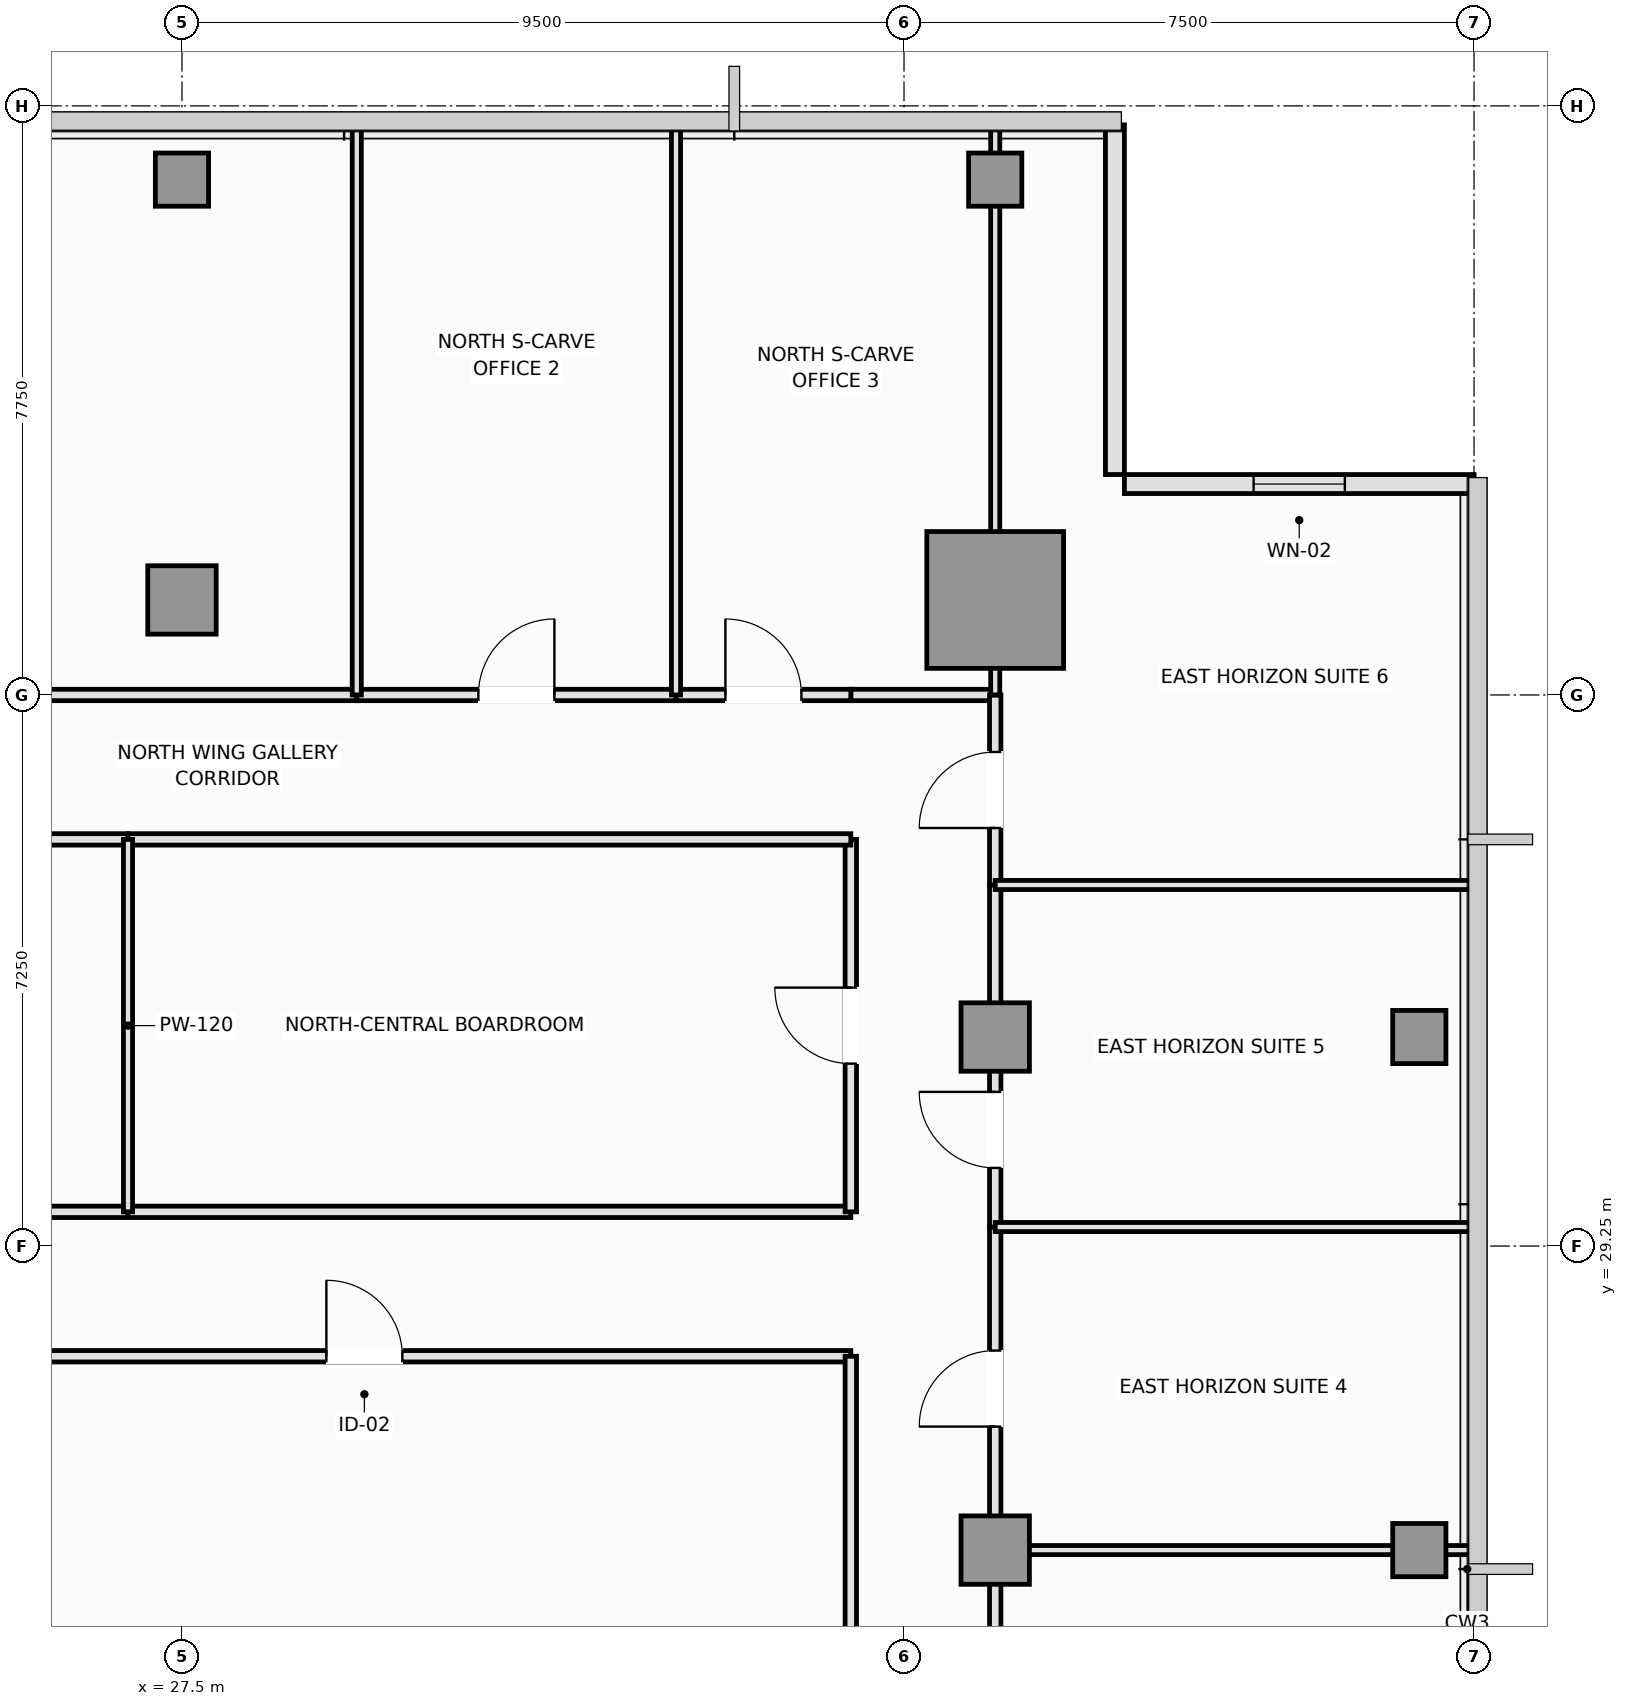
"""IFC4 building model, lengths in metres.
Left out: names, types, materials, properties, quantities, classifications, styles, units other than length and angle.
Written with IfcOpenShell. Run it as: python <this file> out.ifc"""

import sys

from ifc_helpers import new_model, si_unit, direction, frame, frame_2d, origin, origin_2d, place, context, subcontext, project, spatial, rectangle, extrude, element, fill, save


model = new_model("IFC4")
c1 = context("Model", 3, precision=1e-05, world=origin(), true_north=direction((0.0, 1.0)))
c2 = subcontext(c1, "Body", "Model", "MODEL_VIEW")
j1 = project(units=[si_unit("LENGTHUNIT", "METRE"), si_unit("PLANEANGLEUNIT", "RADIAN")], contexts=[c1])
p1 = place(None, origin())
s1 = spatial("IfcSite", under=j1, at=p1, CompositionType="ELEMENT")
p2 = place(p1, origin())
s2 = spatial("IfcBuilding", under=s1, at=p2, CompositionType="ELEMENT")
p3 = place(p2, frame((0.0, 0.0, 284.75)))
s3 = spatial("IfcBuildingStorey", under=s2, at=p3, CompositionType="ELEMENT", Elevation=284.75)
p4 = place(p3, frame((38.2, 37.75, 0.0), z_axis=(0.0, 0.0, 1.0), x_axis=(1.0, 0.0, 0.0)))
e1 = element("IfcColumn", 1, at=p4, inside=s3, PredefinedType="COLUMN", context=c2, shape_type="SweptSolid", body=[
    extrude(rectangle(XDim=1.8, YDim=1.8, at=origin_2d()), origin(), (0.0, 0.0, 1.0), 3.55),
])
for number, where, z_axis, x_axis in (
    (2, (27.5, 37.75, 0.0), (0.0, 0.0, 1.0), (1.0, 0.0, 0.0)),
    (3, (38.2, 25.25, 0.0), (0.0, 0.0, 1.0), (1.0, 0.0, 0.0)),
    (4, (38.2, 32.0, 0.0), (0.0, 0.0, 1.0), (1.0, 0.0, 0.0)),
):
    element("IfcColumn", number, at=place(p3, frame(where, z_axis=z_axis, x_axis=x_axis)), inside=s3, PredefinedType="COLUMN", context=c2, shape_type="SweptSolid", body=[
        extrude(rectangle(XDim=0.9, YDim=0.9, at=origin_2d()), origin(), (0.0, 0.0, 1.0), 3.55),
    ])
for number, where, z_axis, x_axis in (
    (5, (43.78, 25.25, 0.0), (0.0, 0.0, 1.0), (1.0, 0.0, 0.0)),
    (6, (43.78, 32.0, 0.0), (0.0, 0.0, 1.0), (1.0, 0.0, 0.0)),
    (7, (27.5, 43.28, 0.0), (0.0, 0.0, 1.0), (1.0, 0.0, 0.0)),
    (8, (38.2, 43.28, 0.0), (0.0, 0.0, 1.0), (1.0, 0.0, 0.0)),
):
    element("IfcColumn", number, at=place(p3, frame(where, z_axis=z_axis, x_axis=x_axis)), inside=s3, PredefinedType="COLUMN", context=c2, shape_type="SweptSolid", body=[
        extrude(rectangle(XDim=0.7, YDim=0.7, at=origin_2d()), origin(), (0.0, 0.0, 1.0), 3.55),
    ])
p5 = place(p3, frame((44.5, 39.275, 0.0), z_axis=(0.0, 0.0, 1.0), x_axis=(-1.0, 0.0, 0.0)))
e9 = element("IfcWall", 9, at=p5, inside=s3, PredefinedType="SOLIDWALL", context=c2, shape_type="SweptSolid", body=[
    extrude(rectangle(XDim=4.6, YDim=0.25, at=frame_2d((2.3, 0.0))), origin(), (0.0, 0.0, 1.0), 3.39),
])
p6 = place(p5, frame((1.7, 0.0, 0.9)))
e10 = element("IfcOpeningElement", 10, at=p6, cuts=e9, PredefinedType="OPENING", context=c2, shape_type="SweptSolid", body=[
    extrude(rectangle(XDim=1.2, YDim=1.8, at=frame_2d((0.6, 0.9))), frame((0.0, 0.135, 0.0), z_axis=(0.0, -1.0, 0.0), x_axis=(1.0, 0.0, 0.0)), (0.0, 0.0, 1.0), 0.27),
])
p7 = place(p3, frame((39.775, 39.4, 0.0), z_axis=(0.0, 0.0, 1.0), x_axis=(0.0, 1.0, 0.0)))
e11 = element("IfcWall", 11, at=p7, inside=s3, PredefinedType="SOLIDWALL", context=c2, shape_type="SweptSolid", body=[
    extrude(rectangle(XDim=4.6, YDim=0.25, at=frame_2d((2.3, 0.0))), origin(), (0.0, 0.0, 1.0), 3.39),
])
p8 = place(p3, frame((19.9, 29.7, 0.0), z_axis=(0.0, 0.0, 1.0), x_axis=(1.0, 0.0, 0.0)))
e12 = element("IfcWall", 12, at=p8, inside=s3, PredefinedType="PARTITIONING", context=c2, shape_type="SweptSolid", body=[
    extrude(rectangle(XDim=6.89, YDim=0.15, at=frame_2d((3.445, 0.0))), origin(), (0.0, 0.0, 1.0), 3.39),
])
p9 = place(p3, frame((26.79, 29.7, 0.0), z_axis=(0.0, 0.0, 1.0), x_axis=(1.0, 0.0, 0.0)))
e13 = element("IfcWall", 13, at=p9, inside=s3, PredefinedType="PARTITIONING", context=c2, shape_type="SweptSolid", body=[
    extrude(rectangle(XDim=9.51, YDim=0.15, at=frame_2d((4.755, 0.0))), origin(), (0.0, 0.0, 1.0), 3.39),
])
p10 = place(p3, frame((23.5, 27.8, 0.0), z_axis=(0.0, 0.0, 1.0), x_axis=(1.0, 0.0, 0.0)))
e14 = element("IfcWall", 14, at=p10, inside=s3, PredefinedType="PARTITIONING", context=c2, shape_type="SweptSolid", body=[
    extrude(rectangle(XDim=12.8, YDim=0.15, at=frame_2d((6.4, 0.0))), origin(), (0.0, 0.0, 1.0), 3.39),
])
p11 = place(p10, frame((5.9, 0.0, 0.0)))
e15 = element("IfcOpeningElement", 15, at=p11, cuts=e14, PredefinedType="OPENING", context=c2, shape_type="SweptSolid", body=[
    extrude(rectangle(XDim=1.0, YDim=2.15, at=frame_2d((0.5, 1.075))), frame((0.0, 0.085, 0.0), z_axis=(0.0, -1.0, 0.0), x_axis=(1.0, 0.0, 0.0)), (0.0, 0.0, 1.0), 0.17),
])
p12 = place(p3, frame((36.3, 29.7, 0.0), z_axis=(0.0, 0.0, 1.0), x_axis=(0.0, 1.0, 0.0)))
e16 = element("IfcWall", 16, at=p12, inside=s3, PredefinedType="PARTITIONING", context=c2, shape_type="SweptSolid", body=[
    extrude(rectangle(XDim=4.9, YDim=0.15, at=frame_2d((2.45, 0.0))), origin(), (0.0, 0.0, 1.0), 3.39),
])
p13 = place(p12, frame((1.95, 0.0, 0.0)))
e17 = element("IfcOpeningElement", 17, at=p13, cuts=e16, PredefinedType="OPENING", context=c2, shape_type="SweptSolid", body=[
    extrude(rectangle(XDim=1.0, YDim=2.15, at=frame_2d((0.5, 1.075))), frame((0.0, 0.085, 0.0), z_axis=(0.0, -1.0, 0.0), x_axis=(1.0, 0.0, 0.0)), (0.0, 0.0, 1.0), 0.17),
])
p14 = place(p3, frame((36.3, 17.6, 0.0), z_axis=(0.0, 0.0, 1.0), x_axis=(0.0, 1.0, 0.0)))
e18 = element("IfcWall", 18, at=p14, inside=s3, PredefinedType="PARTITIONING", context=c2, shape_type="SweptSolid", body=[
    extrude(rectangle(XDim=10.2, YDim=0.15, at=frame_2d((5.1, 0.0))), origin(), (0.0, 0.0, 1.0), 3.39),
])
p15 = place(p3, frame((36.3, 36.5, 0.0), z_axis=(0.0, 0.0, 1.0), x_axis=(1.0, 0.0, 0.0)))
e19 = element("IfcWall", 19, at=p15, inside=s3, PredefinedType="PARTITIONING", context=c2, shape_type="SweptSolid", body=[
    extrude(rectangle(XDim=1.9, YDim=0.15, at=frame_2d((0.95, 0.0))), origin(), (0.0, 0.0, 1.0), 3.39),
])
p16 = place(p3, frame((38.2, 21.0, 0.0), z_axis=(0.0, 0.0, 1.0), x_axis=(0.0, 1.0, 0.0)))
e20 = element("IfcWall", 20, at=p16, inside=s3, PredefinedType="PARTITIONING", context=c2, shape_type="SweptSolid", body=[
    extrude(rectangle(XDim=4.25, YDim=0.15, at=frame_2d((2.125, 0.0))), origin(), (0.0, 0.0, 1.0), 2.99),
])
p17 = place(p16, frame((1.625, 0.0, 0.0)))
e21 = element("IfcOpeningElement", 21, at=p17, cuts=e20, PredefinedType="OPENING", context=c2, shape_type="SweptSolid", body=[
    extrude(rectangle(XDim=1.0, YDim=2.15, at=frame_2d((0.5, 1.075))), frame((0.0, 0.085, 0.0), z_axis=(0.0, -1.0, 0.0), x_axis=(1.0, 0.0, 0.0)), (0.0, 0.0, 1.0), 0.17),
])
p18 = place(p3, frame((38.2, 25.25, 0.0), z_axis=(0.0, 0.0, 1.0), x_axis=(0.0, 1.0, 0.0)))
e22 = element("IfcWall", 22, at=p18, inside=s3, PredefinedType="PARTITIONING", context=c2, shape_type="SweptSolid", body=[
    extrude(rectangle(XDim=4.25, YDim=0.15, at=frame_2d((2.125, 0.0))), origin(), (0.0, 0.0, 1.0), 2.99),
])
p19 = place(p18, frame((1.625, 0.0, 0.0)))
e23 = element("IfcOpeningElement", 23, at=p19, cuts=e22, PredefinedType="OPENING", context=c2, shape_type="SweptSolid", body=[
    extrude(rectangle(XDim=1.0, YDim=2.15, at=frame_2d((0.5, 1.075))), frame((0.0, 0.085, 0.0), z_axis=(0.0, -1.0, 0.0), x_axis=(1.0, 0.0, 0.0)), (0.0, 0.0, 1.0), 0.17),
])
p20 = place(p3, frame((38.2, 29.5, 0.0), z_axis=(0.0, 0.0, 1.0), x_axis=(0.0, 1.0, 0.0)))
e24 = element("IfcWall", 24, at=p20, inside=s3, PredefinedType="PARTITIONING", context=c2, shape_type="SweptSolid", body=[
    extrude(rectangle(XDim=4.5, YDim=0.15, at=frame_2d((2.25, 0.0))), origin(), (0.0, 0.0, 1.0), 2.99),
])
p21 = place(p20, frame((0.778, 0.0, 0.0)))
e25 = element("IfcOpeningElement", 25, at=p21, cuts=e24, PredefinedType="OPENING", context=c2, shape_type="SweptSolid", body=[
    extrude(rectangle(XDim=1.0, YDim=2.15, at=frame_2d((0.5, 1.075))), frame((0.0, 0.085, 0.0), z_axis=(0.0, -1.0, 0.0), x_axis=(1.0, 0.0, 0.0)), (0.0, 0.0, 1.0), 0.17),
])
p22 = place(p3, frame((38.2, 34.0, 0.0), z_axis=(0.0, 0.0, 1.0), x_axis=(0.0, 1.0, 0.0)))
e26 = element("IfcWall", 26, at=p22, inside=s3, PredefinedType="PARTITIONING", context=c2, shape_type="SweptSolid", body=[
    extrude(rectangle(XDim=2.5, YDim=0.15, at=frame_2d((1.25, 0.0))), origin(), (0.0, 0.0, 1.0), 2.99),
])
p23 = place(p22, frame((0.75, 0.0, 0.0)))
e27 = element("IfcOpeningElement", 27, at=p23, cuts=e26, PredefinedType="OPENING", context=c2, shape_type="SweptSolid", body=[
    extrude(rectangle(XDim=1.0, YDim=2.15, at=frame_2d((0.5, 1.075))), frame((0.0, 0.085, 0.0), z_axis=(0.0, -1.0, 0.0), x_axis=(1.0, 0.0, 0.0)), (0.0, 0.0, 1.0), 0.17),
])
p24 = place(p3, frame((19.9, 34.6, 0.0), z_axis=(0.0, 0.0, 1.0), x_axis=(1.0, 0.0, 0.0)))
e28 = element("IfcWall", 28, at=p24, inside=s3, PredefinedType="PARTITIONING", context=c2, shape_type="SweptSolid", body=[
    extrude(rectangle(XDim=6.89, YDim=0.15, at=frame_2d((3.445, 0.0))), origin(), (0.0, 0.0, 1.0), 3.39),
])
p25 = place(p3, frame((26.79, 34.6, 0.0), z_axis=(0.0, 0.0, 1.0), x_axis=(1.0, 0.0, 0.0)))
e29 = element("IfcWall", 29, at=p25, inside=s3, PredefinedType="PARTITIONING", context=c2, shape_type="SweptSolid", body=[
    extrude(rectangle(XDim=9.51, YDim=0.15, at=frame_2d((4.755, 0.0))), origin(), (0.0, 0.0, 1.0), 3.39),
])
p26 = place(p3, frame((19.9, 36.5, 0.0), z_axis=(0.0, 0.0, 1.0), x_axis=(1.0, 0.0, 0.0)))
e30 = element("IfcWall", 30, at=p26, inside=s3, PredefinedType="PARTITIONING", context=c2, shape_type="SweptSolid", body=[
    extrude(rectangle(XDim=9.9, YDim=0.15, at=frame_2d((4.95, 0.0))), origin(), (0.0, 0.0, 1.0), 3.39),
])
p27 = place(p3, frame((29.8, 36.5, 0.0), z_axis=(0.0, 0.0, 1.0), x_axis=(1.0, 0.0, 0.0)))
e31 = element("IfcWall", 31, at=p27, inside=s3, PredefinedType="PARTITIONING", context=c2, shape_type="SweptSolid", body=[
    extrude(rectangle(XDim=4.2, YDim=0.15, at=frame_2d((2.1, 0.0))), origin(), (0.0, 0.0, 1.0), 3.39),
])
p28 = place(p27, frame((1.6, 0.0, 0.0)))
e32 = element("IfcOpeningElement", 32, at=p28, cuts=e31, PredefinedType="OPENING", context=c2, shape_type="SweptSolid", body=[
    extrude(rectangle(XDim=1.0, YDim=2.15, at=frame_2d((0.5, 1.075))), frame((0.0, 0.085, 0.0), z_axis=(0.0, -1.0, 0.0), x_axis=(1.0, 0.0, 0.0)), (0.0, 0.0, 1.0), 0.17),
])
p29 = place(p3, frame((34.0, 36.5, 0.0), z_axis=(0.0, 0.0, 1.0), x_axis=(1.0, 0.0, 0.0)))
e33 = element("IfcWall", 33, at=p29, inside=s3, PredefinedType="PARTITIONING", context=c2, shape_type="SweptSolid", body=[
    extrude(rectangle(XDim=2.3, YDim=0.15, at=frame_2d((1.15, 0.0))), origin(), (0.0, 0.0, 1.0), 3.39),
])
p30 = place(p29, frame((0.65, 0.0, 0.0)))
e34 = element("IfcOpeningElement", 34, at=p30, cuts=e33, PredefinedType="OPENING", context=c2, shape_type="SweptSolid", body=[
    extrude(rectangle(XDim=1.0, YDim=2.15, at=frame_2d((0.5, 1.075))), frame((0.0, 0.085, 0.0), z_axis=(0.0, -1.0, 0.0), x_axis=(1.0, 0.0, 0.0)), (0.0, 0.0, 1.0), 0.17),
])
p31 = place(p3, frame((26.79, 29.7, 0.0), z_axis=(0.0, 0.0, 1.0), x_axis=(0.0, 1.0, 0.0)))
e35 = element("IfcWall", 35, at=p31, inside=s3, PredefinedType="PARTITIONING", context=c2, shape_type="SweptSolid", body=[
    extrude(rectangle(XDim=4.9, YDim=0.12, at=frame_2d((2.45, 0.0))), origin(), (0.0, 0.0, 1.0), 3.39),
])
for number, where, z_axis, x_axis in (
    (36, (29.8, 36.5, 0.0), (0.0, 0.0, 1.0), (0.0, 1.0, 0.0)),
    (37, (34.0, 36.5, 0.0), (0.0, 0.0, 1.0), (0.0, 1.0, 0.0)),
):
    element("IfcWall", number, at=place(p3, frame(where, z_axis=z_axis, x_axis=x_axis)), inside=s3, PredefinedType="PARTITIONING", context=c2, shape_type="SweptSolid", body=[
        extrude(rectangle(XDim=7.49, YDim=0.12, at=frame_2d((3.745, 0.0))), origin(), (0.0, 0.0, 1.0), 3.39),
    ])
p32 = place(p3, frame((38.2, 36.5, 0.0), z_axis=(0.0, 0.0, 1.0), x_axis=(0.0, 1.0, 0.0)))
e38 = element("IfcWall", 38, at=p32, inside=s3, PredefinedType="PARTITIONING", context=c2, shape_type="SweptSolid", body=[
    extrude(rectangle(XDim=7.49, YDim=0.12, at=frame_2d((3.745, 0.0))), origin(), (0.0, 0.0, 1.0), 2.99),
])
p33 = place(p3, frame((38.2, 25.25, 0.0), z_axis=(0.0, 0.0, 1.0), x_axis=(1.0, 0.0, 0.0)))
e39 = element("IfcWall", 39, at=p33, inside=s3, PredefinedType="PARTITIONING", context=c2, shape_type="SweptSolid", body=[
    extrude(rectangle(XDim=6.29, YDim=0.12, at=frame_2d((3.145, 0.0))), origin(), (0.0, 0.0, 1.0), 2.94),
])
for number, where, z_axis, x_axis in (
    (40, (38.2, 29.5, 0.0), (0.0, 0.0, 1.0), (1.0, 0.0, 0.0)),
    (41, (38.2, 34.0, 0.0), (0.0, 0.0, 1.0), (1.0, 0.0, 0.0)),
):
    element("IfcWall", number, at=place(p3, frame(where, z_axis=z_axis, x_axis=x_axis)), inside=s3, PredefinedType="PARTITIONING", context=c2, shape_type="SweptSolid", body=[
        extrude(rectangle(XDim=6.29, YDim=0.12, at=frame_2d((3.145, 0.0))), origin(), (0.0, 0.0, 1.0), 3.39),
    ])
p34 = place(p6, origin())
e42 = element("IfcWindow", 42, at=p34, inside=s3, PartitioningType="SINGLE_PANEL", PredefinedType="WINDOW", context=c2, shape_type="SweptSolid", body=[
    extrude(rectangle(XDim=1.2, YDim=1.8, at=frame_2d((0.6, 0.9))), frame((0.0, 0.03, 0.0), z_axis=(0.0, -1.0, 0.0), x_axis=(1.0, 0.0, 0.0)), (0.0, 0.0, 1.0), 0.06),
])
fill(e10, e42)
p35 = place(p11, origin())
e43 = element("IfcDoor", 43, at=p35, inside=s3, OperationType="SINGLE_SWING_LEFT", PredefinedType="DOOR", context=c2, shape_type="SweptSolid", body=[
    extrude(rectangle(XDim=1.0, YDim=2.15, at=frame_2d((0.5, 1.075))), frame((0.0, 0.025, 0.0), z_axis=(0.0, -1.0, 0.0), x_axis=(1.0, 0.0, 0.0)), (0.0, 0.0, 1.0), 0.05),
])
fill(e15, e43)
p36 = place(p13, origin())
e44 = element("IfcDoor", 44, at=p36, inside=s3, OperationType="SINGLE_SWING_RIGHT", PredefinedType="DOOR", context=c2, shape_type="SweptSolid", body=[
    extrude(rectangle(XDim=1.0, YDim=2.15, at=frame_2d((0.5, 1.075))), frame((0.0, 0.025, 0.0), z_axis=(0.0, -1.0, 0.0), x_axis=(1.0, 0.0, 0.0)), (0.0, 0.0, 1.0), 0.05),
])
fill(e17, e44)
p37 = place(p19, origin())
e45 = element("IfcDoor", 45, at=p37, inside=s3, OperationType="SINGLE_SWING_LEFT", PredefinedType="DOOR", context=c2, shape_type="SweptSolid", body=[
    extrude(rectangle(XDim=1.0, YDim=2.15, at=frame_2d((0.5, 1.075))), frame((0.0, 0.025, 0.0), z_axis=(0.0, -1.0, 0.0), x_axis=(1.0, 0.0, 0.0)), (0.0, 0.0, 1.0), 0.05),
])
fill(e23, e45)
p38 = place(p21, origin())
e46 = element("IfcDoor", 46, at=p38, inside=s3, OperationType="SINGLE_SWING_RIGHT", PredefinedType="DOOR", context=c2, shape_type="SweptSolid", body=[
    extrude(rectangle(XDim=1.0, YDim=2.15, at=frame_2d((0.5, 1.075))), frame((0.0, 0.025, 0.0), z_axis=(0.0, -1.0, 0.0), x_axis=(1.0, 0.0, 0.0)), (0.0, 0.0, 1.0), 0.05),
])
fill(e25, e46)
p39 = place(p23, origin())
e47 = element("IfcDoor", 47, at=p39, inside=s3, OperationType="SINGLE_SWING_LEFT", PredefinedType="DOOR", context=c2, shape_type="SweptSolid", body=[
    extrude(rectangle(XDim=1.0, YDim=2.15, at=frame_2d((0.5, 1.075))), frame((0.0, 0.025, 0.0), z_axis=(0.0, -1.0, 0.0), x_axis=(1.0, 0.0, 0.0)), (0.0, 0.0, 1.0), 0.05),
])
fill(e27, e47)
p40 = place(p28, origin())
e48 = element("IfcDoor", 48, at=p40, inside=s3, OperationType="SINGLE_SWING_RIGHT", PredefinedType="DOOR", context=c2, shape_type="SweptSolid", body=[
    extrude(rectangle(XDim=1.0, YDim=2.15, at=frame_2d((0.5, 1.075))), frame((0.0, 0.025, 0.0), z_axis=(0.0, -1.0, 0.0), x_axis=(1.0, 0.0, 0.0)), (0.0, 0.0, 1.0), 0.05),
])
fill(e32, e48)
p41 = place(p30, origin())
e49 = element("IfcDoor", 49, at=p41, inside=s3, OperationType="SINGLE_SWING_LEFT", PredefinedType="DOOR", context=c2, shape_type="SweptSolid", body=[
    extrude(rectangle(XDim=1.0, YDim=2.15, at=frame_2d((0.5, 1.075))), frame((0.0, 0.025, 0.0), z_axis=(0.0, -1.0, 0.0), x_axis=(1.0, 0.0, 0.0)), (0.0, 0.0, 1.0), 0.05),
])
fill(e34, e49)
save(model, sys.argv[1])
